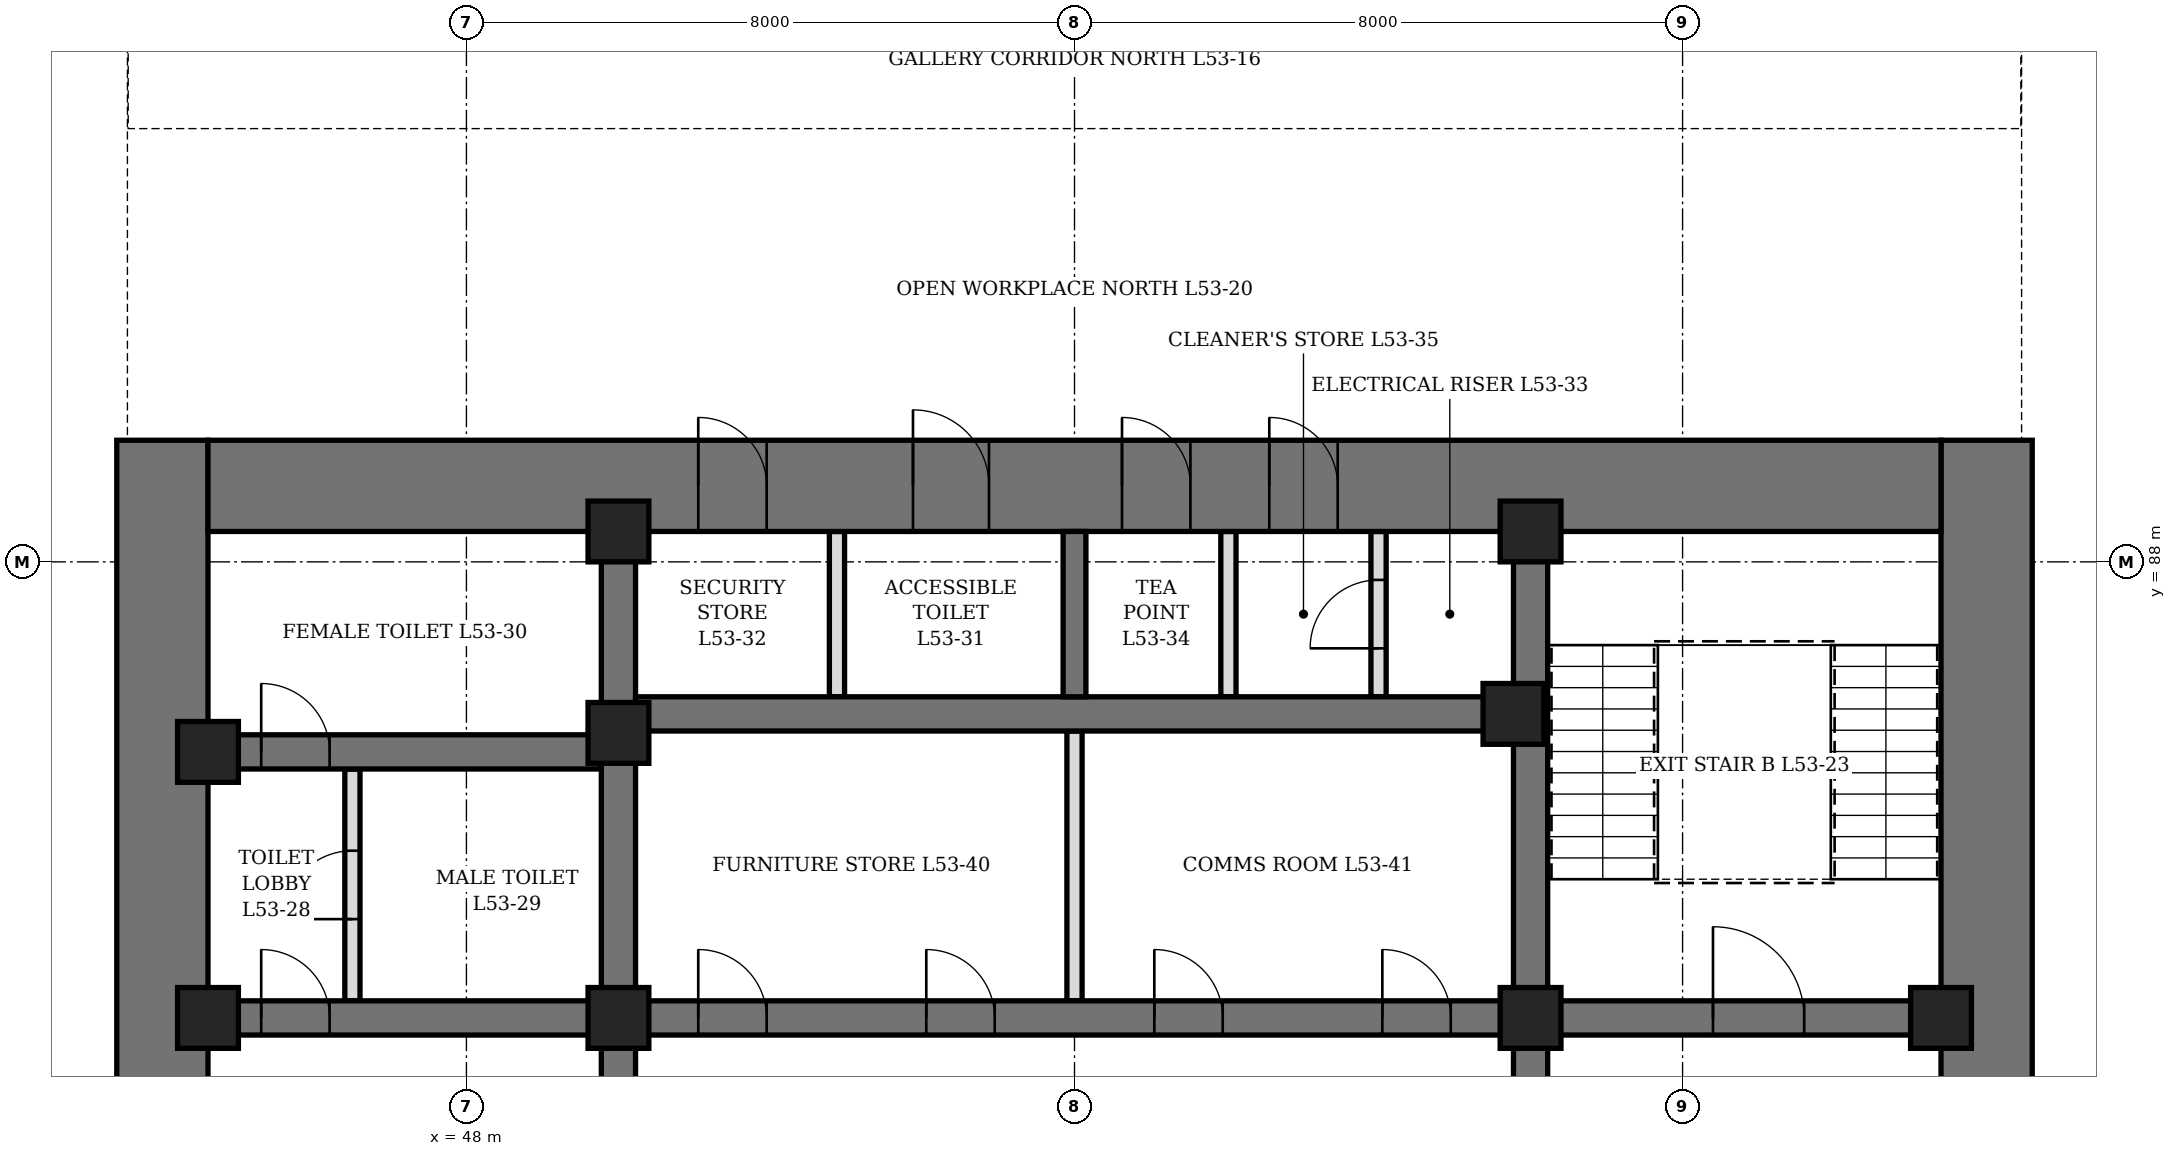
"""IFC4 building model, lengths in metres.
Left out: names, types, materials, properties, quantities, classifications, styles, units other than length and angle.
Written with IfcOpenShell. Run it as: python <this file> out.ifc"""

import sys

from ifc_helpers import new_model, si_unit, direction, frame, frame_2d, origin, origin_2d, place, context, subcontext, project, spatial, rectangle, hollow_rectangle, extrude, element, fill, save


model = new_model("IFC4")
c1 = context("Model", 3, precision=1e-05, world=origin(), true_north=direction((0.0, 1.0)))
c2 = subcontext(c1, "Body", "Model", "MODEL_VIEW")
j1 = project(units=[si_unit("LENGTHUNIT", "METRE"), si_unit("PLANEANGLEUNIT", "RADIAN")], contexts=[c1])
p1 = place(None, origin())
s1 = spatial("IfcSite", under=j1, at=p1, CompositionType="ELEMENT")
p2 = place(p1, origin())
s2 = spatial("IfcBuilding", under=s1, at=p2, CompositionType="ELEMENT")
p3 = place(p2, frame((0.0, 0.0, 235.9)))
s3 = spatial("IfcBuildingStorey", under=s2, at=p3, CompositionType="ELEMENT", Elevation=235.9)
p4 = place(p3, frame((44.0, 70.4, 0.0), z_axis=(0.0, 0.0, 1.0), x_axis=(0.0, 1.0, 0.0)))
e1 = element("IfcWall", 1, at=p4, inside=s3, PredefinedType="SHEAR", context=c2, shape_type="SweptSolid", body=[
    extrude(rectangle(XDim=19.2, YDim=1.2, at=frame_2d((9.6, 0.0))), origin(), (0.0, 0.0, 1.0), 4.2),
])
p5 = place(p4, frame((8.6, 0.0, 0.0)))
e2 = element("IfcOpeningElement", 2, at=p5, cuts=e1, PredefinedType="OPENING", context=c2, shape_type="SweptSolid", body=[
    extrude(rectangle(XDim=2.0, YDim=2.4, at=frame_2d((1.0, 1.2))), frame((0.0, 0.61, 0.0), z_axis=(0.0, -1.0, 0.0), x_axis=(1.0, 0.0, 0.0)), (0.0, 0.0, 1.0), 1.22),
])
p6 = place(p3, frame((68.0, 70.4, 0.0), z_axis=(0.0, 0.0, 1.0), x_axis=(0.0, 1.0, 0.0)))
e3 = element("IfcWall", 3, at=p6, inside=s3, PredefinedType="SHEAR", context=c2, shape_type="SweptSolid", body=[
    extrude(rectangle(XDim=19.2, YDim=1.2, at=frame_2d((9.6, 0.0))), origin(), (0.0, 0.0, 1.0), 4.2),
])
p7 = place(p6, frame((8.6, 0.0, 0.0)))
e4 = element("IfcOpeningElement", 4, at=p7, cuts=e3, PredefinedType="OPENING", context=c2, shape_type="SweptSolid", body=[
    extrude(rectangle(XDim=2.0, YDim=2.4, at=frame_2d((1.0, 1.2))), frame((0.0, 0.61, 0.0), z_axis=(0.0, -1.0, 0.0), x_axis=(1.0, 0.0, 0.0)), (0.0, 0.0, 1.0), 1.22),
])
p8 = place(p3, frame((44.6, 89.0, 0.0), z_axis=(0.0, 0.0, 1.0), x_axis=(1.0, 0.0, 0.0)))
e5 = element("IfcWall", 5, at=p8, inside=s3, PredefinedType="SHEAR", context=c2, shape_type="SweptSolid", body=[
    extrude(rectangle(XDim=22.8, YDim=1.2, at=frame_2d((11.4, 0.0))), origin(), (0.0, 0.0, 1.0), 4.2),
])
p9 = place(p8, frame((9.275, 0.0, 0.0)))
e6 = element("IfcOpeningElement", 6, at=p9, cuts=e5, PredefinedType="OPENING", context=c2, shape_type="SweptSolid", body=[
    extrude(rectangle(XDim=1.0, YDim=2.1, at=frame_2d((0.5, 1.05))), frame((0.0, 0.61, 0.0), z_axis=(0.0, -1.0, 0.0), x_axis=(1.0, 0.0, 0.0)), (0.0, 0.0, 1.0), 1.22),
])
p10 = place(p8, frame((6.45, 0.0, 0.0)))
e7 = element("IfcOpeningElement", 7, at=p10, cuts=e5, PredefinedType="OPENING", context=c2, shape_type="SweptSolid", body=[
    extrude(rectangle(XDim=0.9, YDim=2.1, at=frame_2d((0.45, 1.05))), frame((0.0, 0.61, 0.0), z_axis=(0.0, -1.0, 0.0), x_axis=(1.0, 0.0, 0.0)), (0.0, 0.0, 1.0), 1.22),
])
p11 = place(p8, frame((12.025, 0.0, 0.0)))
e8 = element("IfcOpeningElement", 8, at=p11, cuts=e5, PredefinedType="OPENING", context=c2, shape_type="SweptSolid", body=[
    extrude(rectangle(XDim=0.9, YDim=2.1, at=frame_2d((0.45, 1.05))), frame((0.0, 0.61, 0.0), z_axis=(0.0, -1.0, 0.0), x_axis=(1.0, 0.0, 0.0)), (0.0, 0.0, 1.0), 1.22),
])
p12 = place(p8, frame((13.962, 0.0, 0.0)))
e9 = element("IfcOpeningElement", 9, at=p12, cuts=e5, PredefinedType="OPENING", context=c2, shape_type="SweptSolid", body=[
    extrude(rectangle(XDim=0.9, YDim=2.1, at=frame_2d((0.45, 1.05))), frame((0.0, 0.61, 0.0), z_axis=(0.0, -1.0, 0.0), x_axis=(1.0, 0.0, 0.0)), (0.0, 0.0, 1.0), 1.22),
])
p13 = place(p3, frame((50.0, 71.6, 0.0), z_axis=(0.0, 0.0, 1.0), x_axis=(0.0, 1.0, 0.0)))
e10 = element("IfcWall", 10, at=p13, inside=s3, PredefinedType="SHEAR", context=c2, shape_type="SweptSolid", body=[
    extrude(rectangle(XDim=16.8, YDim=0.45, at=frame_2d((8.4, 0.0))), origin(), (0.0, 0.0, 1.0), 4.2),
])
p14 = place(p13, frame((7.5, 0.0, 0.0)))
e11 = element("IfcOpeningElement", 11, at=p14, cuts=e10, PredefinedType="OPENING", context=c2, shape_type="SweptSolid", body=[
    extrude(rectangle(XDim=1.8, YDim=2.4, at=frame_2d((0.9, 1.2))), frame((0.0, 0.235, 0.0), z_axis=(0.0, -1.0, 0.0), x_axis=(1.0, 0.0, 0.0)), (0.0, 0.0, 1.0), 0.47),
])
p15 = place(p3, frame((62.0, 71.6, 0.0), z_axis=(0.0, 0.0, 1.0), x_axis=(0.0, 1.0, 0.0)))
e12 = element("IfcWall", 12, at=p15, inside=s3, PredefinedType="SHEAR", context=c2, shape_type="SweptSolid", body=[
    extrude(rectangle(XDim=16.8, YDim=0.45, at=frame_2d((8.4, 0.0))), origin(), (0.0, 0.0, 1.0), 4.2),
])
p16 = place(p15, frame((7.5, 0.0, 0.0)))
e13 = element("IfcOpeningElement", 13, at=p16, cuts=e12, PredefinedType="OPENING", context=c2, shape_type="SweptSolid", body=[
    extrude(rectangle(XDim=1.8, YDim=2.4, at=frame_2d((0.9, 1.2))), frame((0.0, 0.235, 0.0), z_axis=(0.0, -1.0, 0.0), x_axis=(1.0, 0.0, 0.0)), (0.0, 0.0, 1.0), 0.47),
])
p17 = place(p3, frame((44.6, 82.0, 0.0), z_axis=(0.0, 0.0, 1.0), x_axis=(1.0, 0.0, 0.0)))
e14 = element("IfcWall", 14, at=p17, inside=s3, PredefinedType="SHEAR", context=c2, shape_type="SweptSolid", body=[
    extrude(rectangle(XDim=5.175, YDim=0.45, at=frame_2d((2.587, 0.0))), origin(), (0.0, 0.0, 1.0), 4.2),
])
p18 = place(p17, frame((0.7, 0.0, 0.0)))
e15 = element("IfcOpeningElement", 15, at=p18, cuts=e14, PredefinedType="OPENING", context=c2, shape_type="SweptSolid", body=[
    extrude(rectangle(XDim=0.9, YDim=2.1, at=frame_2d((0.45, 1.05))), frame((0.0, 0.235, 0.0), z_axis=(0.0, -1.0, 0.0), x_axis=(1.0, 0.0, 0.0)), (0.0, 0.0, 1.0), 0.47),
])
p19 = place(p3, frame((44.6, 85.5, 0.0), z_axis=(0.0, 0.0, 1.0), x_axis=(1.0, 0.0, 0.0)))
e16 = element("IfcWall", 16, at=p19, inside=s3, PredefinedType="SHEAR", context=c2, shape_type="SweptSolid", body=[
    extrude(rectangle(XDim=5.175, YDim=0.45, at=frame_2d((2.587, 0.0))), origin(), (0.0, 0.0, 1.0), 4.2),
])
p20 = place(p19, frame((0.7, 0.0, 0.0)))
e17 = element("IfcOpeningElement", 17, at=p20, cuts=e16, PredefinedType="OPENING", context=c2, shape_type="SweptSolid", body=[
    extrude(rectangle(XDim=0.9, YDim=2.1, at=frame_2d((0.45, 1.05))), frame((0.0, 0.235, 0.0), z_axis=(0.0, -1.0, 0.0), x_axis=(1.0, 0.0, 0.0)), (0.0, 0.0, 1.0), 0.47),
])
p21 = place(p3, frame((62.225, 82.0, 0.0), z_axis=(0.0, 0.0, 1.0), x_axis=(1.0, 0.0, 0.0)))
e18 = element("IfcWall", 18, at=p21, inside=s3, PredefinedType="SHEAR", context=c2, shape_type="SweptSolid", body=[
    extrude(rectangle(XDim=5.175, YDim=0.45, at=frame_2d((2.587, 0.0))), origin(), (0.0, 0.0, 1.0), 4.2),
])
p22 = place(p21, frame((2.175, 0.0, 0.0)))
e19 = element("IfcOpeningElement", 19, at=p22, cuts=e18, PredefinedType="OPENING", context=c2, shape_type="SweptSolid", body=[
    extrude(rectangle(XDim=1.2, YDim=2.1, at=frame_2d((0.6, 1.05))), frame((0.0, 0.235, 0.0), z_axis=(0.0, -1.0, 0.0), x_axis=(1.0, 0.0, 0.0)), (0.0, 0.0, 1.0), 0.47),
])
p23 = place(p3, frame((50.225, 82.0, 0.0), z_axis=(0.0, 0.0, 1.0), x_axis=(1.0, 0.0, 0.0)))
e20 = element("IfcWall", 20, at=p23, inside=s3, PredefinedType="SHEAR", context=c2, shape_type="SweptSolid", body=[
    extrude(rectangle(XDim=11.55, YDim=0.45, at=frame_2d((5.775, 0.0))), origin(), (0.0, 0.0, 1.0), 4.2),
])
p24 = place(p23, frame((0.825, 0.0, 0.0)))
e21 = element("IfcOpeningElement", 21, at=p24, cuts=e20, PredefinedType="OPENING", context=c2, shape_type="SweptSolid", body=[
    extrude(rectangle(XDim=0.9, YDim=2.1, at=frame_2d((0.45, 1.05))), frame((0.0, 0.235, 0.0), z_axis=(0.0, -1.0, 0.0), x_axis=(1.0, 0.0, 0.0)), (0.0, 0.0, 1.0), 0.47),
])
p25 = place(p23, frame((3.825, 0.0, 0.0)))
e22 = element("IfcOpeningElement", 22, at=p25, cuts=e20, PredefinedType="OPENING", context=c2, shape_type="SweptSolid", body=[
    extrude(rectangle(XDim=0.9, YDim=2.1, at=frame_2d((0.45, 1.05))), frame((0.0, 0.235, 0.0), z_axis=(0.0, -1.0, 0.0), x_axis=(1.0, 0.0, 0.0)), (0.0, 0.0, 1.0), 0.47),
])
p26 = place(p23, frame((6.825, 0.0, 0.0)))
e23 = element("IfcOpeningElement", 23, at=p26, cuts=e20, PredefinedType="OPENING", context=c2, shape_type="SweptSolid", body=[
    extrude(rectangle(XDim=0.9, YDim=2.1, at=frame_2d((0.45, 1.05))), frame((0.0, 0.235, 0.0), z_axis=(0.0, -1.0, 0.0), x_axis=(1.0, 0.0, 0.0)), (0.0, 0.0, 1.0), 0.47),
])
p27 = place(p23, frame((9.825, 0.0, 0.0)))
e24 = element("IfcOpeningElement", 24, at=p27, cuts=e20, PredefinedType="OPENING", context=c2, shape_type="SweptSolid", body=[
    extrude(rectangle(XDim=0.9, YDim=2.1, at=frame_2d((0.45, 1.05))), frame((0.0, 0.235, 0.0), z_axis=(0.0, -1.0, 0.0), x_axis=(1.0, 0.0, 0.0)), (0.0, 0.0, 1.0), 0.47),
])
p28 = place(p3, frame((50.225, 86.0, 0.0), z_axis=(0.0, 0.0, 1.0), x_axis=(1.0, 0.0, 0.0)))
e25 = element("IfcWall", 25, at=p28, inside=s3, PredefinedType="SHEAR", context=c2, shape_type="SweptSolid", body=[
    extrude(rectangle(XDim=11.55, YDim=0.45, at=frame_2d((5.775, 0.0))), origin(), (0.0, 0.0, 1.0), 4.2),
])
p29 = place(p3, frame((56.0, 86.225, 0.0), z_axis=(0.0, 0.0, 1.0), x_axis=(0.0, 1.0, 0.0)))
e26 = element("IfcWall", 26, at=p29, inside=s3, PredefinedType="SHEAR", context=c2, shape_type="SweptSolid", body=[
    extrude(rectangle(XDim=2.175, YDim=0.3, at=frame_2d((1.087, 0.0))), origin(), (0.0, 0.0, 1.0), 4.2),
])
for number, where, z_axis, x_axis in (
    (27, (44.6, 82.0, 0.0), (0.0, 0.0, 1.0), (1.0, 0.0, 0.0)),
    (28, (44.6, 85.5, 0.0), (0.0, 0.0, 1.0), (1.0, 0.0, 0.0)),
    (29, (50.0, 82.0, 0.0), (0.0, 0.0, 1.0), (1.0, 0.0, 0.0)),
    (30, (50.0, 85.75, 0.0), (0.0, 0.0, 1.0), (1.0, 0.0, 0.0)),
    (31, (50.0, 88.4, 0.0), (0.0, 0.0, 1.0), (1.0, 0.0, 0.0)),
    (32, (61.775, 86.0, 0.0), (0.0, 0.0, 1.0), (1.0, 0.0, 0.0)),
    (33, (62.0, 82.0, 0.0), (0.0, 0.0, 1.0), (1.0, 0.0, 0.0)),
    (34, (62.0, 88.4, 0.0), (0.0, 0.0, 1.0), (1.0, 0.0, 0.0)),
    (35, (67.4, 82.0, 0.0), (0.0, 0.0, 1.0), (1.0, 0.0, 0.0)),
):
    element("IfcColumn", number, at=place(p3, frame(where, z_axis=z_axis, x_axis=x_axis)), inside=s3, PredefinedType="COLUMN", context=c2, shape_type="SweptSolid", body=[
        extrude(hollow_rectangle(XDim=0.8, YDim=0.8, WallThickness=0.1, at=origin_2d()), origin(), (0.0, 0.0, 1.0), 4.2),
    ])
p30 = place(p3, frame((46.5, 82.225, 0.0), z_axis=(0.0, 0.0, 1.0), x_axis=(0.0, 1.0, 0.0)))
e36 = element("IfcWall", 36, at=p30, inside=s3, PredefinedType="PARTITIONING", context=c2, shape_type="SweptSolid", body=[
    extrude(rectangle(XDim=3.05, YDim=0.2, at=frame_2d((1.525, 0.0))), origin(), (0.0, 0.0, 1.0), 4.04),
])
p31 = place(p30, frame((1.075, 0.0, 0.0)))
e37 = element("IfcOpeningElement", 37, at=p31, cuts=e36, PredefinedType="OPENING", context=c2, shape_type="SweptSolid", body=[
    extrude(rectangle(XDim=0.9, YDim=2.1, at=frame_2d((0.45, 1.05))), frame((0.0, 0.11, 0.0), z_axis=(0.0, -1.0, 0.0), x_axis=(1.0, 0.0, 0.0)), (0.0, 0.0, 1.0), 0.22),
])
p32 = place(p3, frame((52.875, 86.225, 0.0), z_axis=(0.0, 0.0, 1.0), x_axis=(0.0, 1.0, 0.0)))
e38 = element("IfcWall", 38, at=p32, inside=s3, PredefinedType="PARTITIONING", context=c2, shape_type="SweptSolid", body=[
    extrude(rectangle(XDim=2.175, YDim=0.2, at=frame_2d((1.087, 0.0))), origin(), (0.0, 0.0, 1.0), 4.04),
])
p33 = place(p3, frame((60.0, 86.225, 0.0), z_axis=(0.0, 0.0, 1.0), x_axis=(0.0, 1.0, 0.0)))
e39 = element("IfcWall", 39, at=p33, inside=s3, PredefinedType="PARTITIONING", context=c2, shape_type="SweptSolid", body=[
    extrude(rectangle(XDim=2.175, YDim=0.2, at=frame_2d((1.087, 0.0))), origin(), (0.0, 0.0, 1.0), 4.04),
])
p34 = place(p33, frame((0.637, 0.0, 0.0)))
e40 = element("IfcOpeningElement", 40, at=p34, cuts=e39, PredefinedType="OPENING", context=c2, shape_type="SweptSolid", body=[
    extrude(rectangle(XDim=0.9, YDim=2.1, at=frame_2d((0.45, 1.05))), frame((0.0, 0.11, 0.0), z_axis=(0.0, -1.0, 0.0), x_axis=(1.0, 0.0, 0.0)), (0.0, 0.0, 1.0), 0.22),
])
p35 = place(p3, frame((58.025, 86.225, 0.0), z_axis=(0.0, 0.0, 1.0), x_axis=(0.0, 1.0, 0.0)))
e41 = element("IfcWall", 41, at=p35, inside=s3, PredefinedType="PARTITIONING", context=c2, shape_type="SweptSolid", body=[
    extrude(rectangle(XDim=2.175, YDim=0.2, at=frame_2d((1.087, 0.0))), origin(), (0.0, 0.0, 1.0), 4.04),
])
p36 = place(p3, frame((56.0, 82.225, 0.0), z_axis=(0.0, 0.0, 1.0), x_axis=(0.0, 1.0, 0.0)))
e42 = element("IfcWall", 42, at=p36, inside=s3, PredefinedType="PARTITIONING", context=c2, shape_type="SweptSolid", body=[
    extrude(rectangle(XDim=3.55, YDim=0.2, at=frame_2d((1.775, 0.0))), origin(), (0.0, 0.0, 1.0), 3.14),
])
p37 = place(p18, origin())
e43 = element("IfcDoor", 43, at=p37, inside=s3, OperationType="SINGLE_SWING_LEFT", PredefinedType="DOOR", context=c2, shape_type="SweptSolid", body=[
    extrude(rectangle(XDim=0.9, YDim=2.1, at=frame_2d((0.45, 1.05))), frame((0.0, 0.225, 0.0), z_axis=(0.0, -1.0, 0.0), x_axis=(1.0, 0.0, 0.0)), (0.0, 0.0, 1.0), 0.449),
])
fill(e15, e43)
p38 = place(p31, origin())
e44 = element("IfcDoor", 44, at=p38, inside=s3, OperationType="SINGLE_SWING_RIGHT", PredefinedType="DOOR", context=c2, shape_type="SweptSolid", body=[
    extrude(rectangle(XDim=0.9, YDim=2.1, at=frame_2d((0.45, 1.05))), frame((0.0, 0.1, 0.0), z_axis=(0.0, -1.0, 0.0), x_axis=(1.0, 0.0, 0.0)), (0.0, 0.0, 1.0), 0.199),
])
fill(e37, e44)
p39 = place(p20, origin())
e45 = element("IfcDoor", 45, at=p39, inside=s3, OperationType="SINGLE_SWING_RIGHT", PredefinedType="DOOR", context=c2, shape_type="SweptSolid", body=[
    extrude(rectangle(XDim=0.9, YDim=2.1, at=frame_2d((0.45, 1.05))), frame((0.0, 0.225, 0.0), z_axis=(0.0, -1.0, 0.0), x_axis=(1.0, 0.0, 0.0)), (0.0, 0.0, 1.0), 0.449),
])
fill(e17, e45)
p40 = place(p9, origin())
e46 = element("IfcDoor", 46, at=p40, inside=s3, OperationType="SINGLE_SWING_LEFT", PredefinedType="DOOR", context=c2, shape_type="SweptSolid", body=[
    extrude(rectangle(XDim=1.0, YDim=2.1, at=frame_2d((0.5, 1.05))), frame((0.0, 0.35, 0.0), z_axis=(0.0, -1.0, 0.0), x_axis=(1.0, 0.0, 0.0)), (0.0, 0.0, 1.0), 0.7),
])
fill(e6, e46)
p41 = place(p10, origin())
e47 = element("IfcDoor", 47, at=p41, inside=s3, OperationType="SINGLE_SWING_LEFT", PredefinedType="DOOR", context=c2, shape_type="SweptSolid", body=[
    extrude(rectangle(XDim=0.9, YDim=2.1, at=frame_2d((0.45, 1.05))), frame((0.0, 0.35, 0.0), z_axis=(0.0, -1.0, 0.0), x_axis=(1.0, 0.0, 0.0)), (0.0, 0.0, 1.0), 0.7),
])
fill(e7, e47)
p42 = place(p11, origin())
e48 = element("IfcDoor", 48, at=p42, inside=s3, OperationType="SINGLE_SWING_LEFT", PredefinedType="DOOR", context=c2, shape_type="SweptSolid", body=[
    extrude(rectangle(XDim=0.9, YDim=2.1, at=frame_2d((0.45, 1.05))), frame((0.0, 0.35, 0.0), z_axis=(0.0, -1.0, 0.0), x_axis=(1.0, 0.0, 0.0)), (0.0, 0.0, 1.0), 0.7),
])
fill(e8, e48)
p43 = place(p12, origin())
e49 = element("IfcDoor", 49, at=p43, inside=s3, OperationType="SINGLE_SWING_LEFT", PredefinedType="DOOR", context=c2, shape_type="SweptSolid", body=[
    extrude(rectangle(XDim=0.9, YDim=2.1, at=frame_2d((0.45, 1.05))), frame((0.0, 0.35, 0.0), z_axis=(0.0, -1.0, 0.0), x_axis=(1.0, 0.0, 0.0)), (0.0, 0.0, 1.0), 0.7),
])
fill(e9, e49)
p44 = place(p34, origin())
e50 = element("IfcDoor", 50, at=p44, inside=s3, OperationType="SINGLE_SWING_LEFT", PredefinedType="DOOR", context=c2, shape_type="SweptSolid", body=[
    extrude(rectangle(XDim=0.9, YDim=2.1, at=frame_2d((0.45, 1.05))), frame((0.0, 0.1, 0.0), z_axis=(0.0, -1.0, 0.0), x_axis=(1.0, 0.0, 0.0)), (0.0, 0.0, 1.0), 0.199),
])
fill(e40, e50)
p45 = place(p24, origin())
e51 = element("IfcDoor", 51, at=p45, inside=s3, OperationType="SINGLE_SWING_LEFT", PredefinedType="DOOR", context=c2, shape_type="SweptSolid", body=[
    extrude(rectangle(XDim=0.9, YDim=2.1, at=frame_2d((0.45, 1.05))), frame((0.0, 0.225, 0.0), z_axis=(0.0, -1.0, 0.0), x_axis=(1.0, 0.0, 0.0)), (0.0, 0.0, 1.0), 0.449),
])
fill(e21, e51)
p46 = place(p25, origin())
e52 = element("IfcDoor", 52, at=p46, inside=s3, OperationType="SINGLE_SWING_LEFT", PredefinedType="DOOR", context=c2, shape_type="SweptSolid", body=[
    extrude(rectangle(XDim=0.9, YDim=2.1, at=frame_2d((0.45, 1.05))), frame((0.0, 0.225, 0.0), z_axis=(0.0, -1.0, 0.0), x_axis=(1.0, 0.0, 0.0)), (0.0, 0.0, 1.0), 0.449),
])
fill(e22, e52)
p47 = place(p26, origin())
e53 = element("IfcDoor", 53, at=p47, inside=s3, OperationType="SINGLE_SWING_LEFT", PredefinedType="DOOR", context=c2, shape_type="SweptSolid", body=[
    extrude(rectangle(XDim=0.9, YDim=2.1, at=frame_2d((0.45, 1.05))), frame((0.0, 0.225, 0.0), z_axis=(0.0, -1.0, 0.0), x_axis=(1.0, 0.0, 0.0)), (0.0, 0.0, 1.0), 0.449),
])
fill(e23, e53)
p48 = place(p27, origin())
e54 = element("IfcDoor", 54, at=p48, inside=s3, OperationType="SINGLE_SWING_LEFT", PredefinedType="DOOR", context=c2, shape_type="SweptSolid", body=[
    extrude(rectangle(XDim=0.9, YDim=2.1, at=frame_2d((0.45, 1.05))), frame((0.0, 0.225, 0.0), z_axis=(0.0, -1.0, 0.0), x_axis=(1.0, 0.0, 0.0)), (0.0, 0.0, 1.0), 0.449),
])
fill(e24, e54)
p49 = place(p22, origin())
e55 = element("IfcDoor", 55, at=p49, inside=s3, OperationType="SINGLE_SWING_LEFT", PredefinedType="DOOR", context=c2, shape_type="SweptSolid", body=[
    extrude(rectangle(XDim=1.2, YDim=2.1, at=frame_2d((0.6, 1.05))), frame((0.0, 0.225, 0.0), z_axis=(0.0, -1.0, 0.0), x_axis=(1.0, 0.0, 0.0)), (0.0, 0.0, 1.0), 0.449),
])
fill(e19, e55)
save(model, sys.argv[1])
